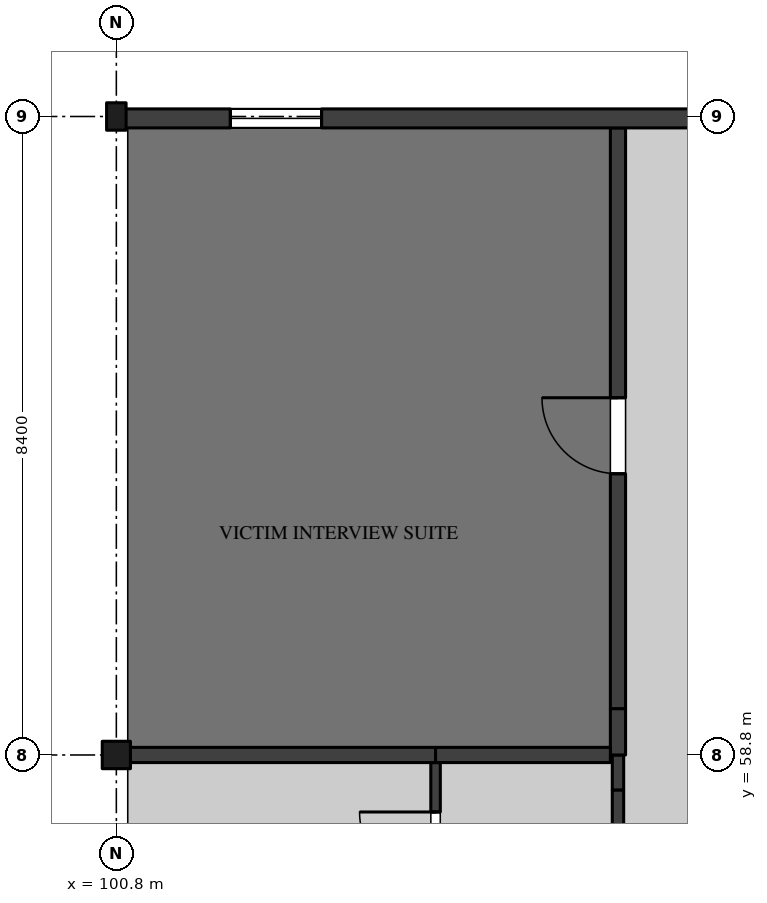
"""IFC4 building model, lengths in metres.
Left out: names, types, materials, properties, quantities, classifications, styles, units other than length and angle.
Written with IfcOpenShell. Run it as: python <this file> out.ifc"""

import sys

from ifc_helpers import new_model, si_unit, direction, frame, frame_2d, origin, origin_2d, place, context, subcontext, project, spatial, rectangle, i_section, extrude, element, fill, save


model = new_model("IFC4")
c1 = context("Model", 3, precision=1e-05, world=origin(), true_north=direction((0.0, 1.0)))
c2 = subcontext(c1, "Body", "Model", "MODEL_VIEW")
j1 = project(units=[si_unit("LENGTHUNIT", "METRE"), si_unit("PLANEANGLEUNIT", "RADIAN")], contexts=[c1])
p1 = place(None, origin())
s1 = spatial("IfcSite", under=j1, at=p1, CompositionType="ELEMENT")
p2 = place(p1, origin())
s2 = spatial("IfcBuilding", under=s1, at=p2, CompositionType="ELEMENT")
p3 = place(p2, frame((0.0, 0.0, 32.4)))
s3 = spatial("IfcBuildingStorey", under=s2, at=p3, CompositionType="ELEMENT", Elevation=32.4)
p4 = place(p3, frame((100.8, 58.8, 0.0), z_axis=(0.0, 0.0, 1.0), x_axis=(1.0, 0.0, 0.0)))
e1 = element("IfcColumn", 1, at=p4, inside=s3, PredefinedType="COLUMN", context=c2, shape_type="SweptSolid", body=[
    extrude(i_section(OverallWidth=0.371, OverallDepth=0.361, WebThickness=0.012, FlangeThickness=0.02, FilletRadius=0.015, at=origin_2d()), origin(), (0.0, 0.0, 1.0), 4.37),
])
p5 = place(p3, frame((100.8, 67.2, 0.0), z_axis=(0.0, 0.0, 1.0), x_axis=(1.0, 0.0, 0.0)))
e2 = element("IfcColumn", 2, at=p5, inside=s3, PredefinedType="COLUMN", context=c2, shape_type="SweptSolid", body=[
    extrude(i_section(OverallWidth=0.257, OverallDepth=0.361, WebThickness=0.011, FlangeThickness=0.02, FilletRadius=0.015, at=origin_2d()), origin(), (0.0, 0.0, 1.0), 4.37),
])
p6 = place(p3, frame((107.4, 50.86, 0.0), z_axis=(0.0, 0.0, 1.0), x_axis=(0.0, 1.0, 0.0)))
e3 = element("IfcWall", 3, at=p6, inside=s3, PredefinedType="PARTITIONING", context=c2, shape_type="SweptSolid", body=[
    extrude(rectangle(XDim=7.48, YDim=0.15, at=frame_2d((3.74, 0.0))), origin(), (0.0, 0.0, 1.0), 4.37),
])
p7 = place(p6, frame((2.09, 0.0, 0.0)))
e4 = element("IfcOpeningElement", 4, at=p7, cuts=e3, PredefinedType="OPENING", context=c2, shape_type="SweptSolid", body=[
    extrude(rectangle(XDim=0.9, YDim=2.1, at=frame_2d((0.45, 1.05))), frame((0.0, 0.085, 0.0), z_axis=(0.0, -1.0, 0.0), x_axis=(1.0, 0.0, 0.0)), (0.0, 0.0, 1.0), 0.17),
])
p8 = place(p3, frame((107.4, 58.34, 0.0), z_axis=(0.0, 0.0, 1.0), x_axis=(0.0, 1.0, 0.0)))
e5 = element("IfcWall", 5, at=p8, inside=s3, PredefinedType="PARTITIONING", context=c2, shape_type="SweptSolid", body=[
    extrude(rectangle(XDim=0.46, YDim=0.15, at=frame_2d((0.23, 0.0))), origin(), (0.0, 0.0, 1.0), 3.746),
])
p9 = place(p3, frame((107.4, 58.8, 0.0), z_axis=(0.0, 0.0, 1.0), x_axis=(0.0, 1.0, 0.0)))
e6 = element("IfcWall", 6, at=p9, inside=s3, PredefinedType="PARTITIONING", context=c2, shape_type="SweptSolid", body=[
    extrude(rectangle(XDim=0.61, YDim=0.2, at=frame_2d((0.305, 0.0))), origin(), (0.0, 0.0, 1.0), 3.746),
])
p10 = place(p3, frame((107.4, 59.41, 0.0), z_axis=(0.0, 0.0, 1.0), x_axis=(0.0, 1.0, 0.0)))
e7 = element("IfcWall", 7, at=p10, inside=s3, PredefinedType="PARTITIONING", context=c2, shape_type="SweptSolid", body=[
    extrude(rectangle(XDim=7.64, YDim=0.2, at=frame_2d((3.82, 0.0))), origin(), (0.0, 0.0, 1.0), 4.37),
])
p11 = place(p10, frame((3.09, 0.0, 0.0)))
e8 = element("IfcOpeningElement", 8, at=p11, cuts=e7, PredefinedType="OPENING", context=c2, shape_type="SweptSolid", body=[
    extrude(rectangle(XDim=1.0, YDim=2.1, at=frame_2d((0.5, 1.05))), frame((0.0, 0.11, 0.0), z_axis=(0.0, -1.0, 0.0), x_axis=(1.0, 0.0, 0.0)), (0.0, 0.0, 1.0), 0.22),
])
p12 = place(p3, frame((105.0, 56.4, 0.0), z_axis=(0.0, 0.0, 1.0), x_axis=(0.0, 1.0, 0.0)))
e9 = element("IfcWall", 9, at=p12, inside=s3, PredefinedType="PARTITIONING", context=c2, shape_type="SweptSolid", body=[
    extrude(rectangle(XDim=2.3, YDim=0.125, at=frame_2d((1.15, 0.0))), origin(), (0.0, 0.0, 1.0), 4.37),
])
p13 = place(p12, frame((0.65, 0.0, 0.0)))
e10 = element("IfcOpeningElement", 10, at=p13, cuts=e9, PredefinedType="OPENING", context=c2, shape_type="SweptSolid", body=[
    extrude(rectangle(XDim=1.0, YDim=2.1, at=frame_2d((0.5, 1.05))), frame((0.0, 0.073, 0.0), z_axis=(0.0, -1.0, 0.0), x_axis=(1.0, 0.0, 0.0)), (0.0, 0.0, 1.0), 0.145),
])
p14 = place(p3, frame((100.986, 58.8, 0.0), z_axis=(0.0, 0.0, 1.0), x_axis=(1.0, 0.0, 0.0)))
e11 = element("IfcWall", 11, at=p14, inside=s3, PredefinedType="PARTITIONING", context=c2, shape_type="SweptSolid", body=[
    extrude(rectangle(XDim=4.014, YDim=0.2, at=frame_2d((2.007, 0.0))), origin(), (0.0, 0.0, 1.0), 3.746),
])
p15 = place(p3, frame((105.0, 58.8, 0.0), z_axis=(0.0, 0.0, 1.0), x_axis=(1.0, 0.0, 0.0)))
e12 = element("IfcWall", 12, at=p15, inside=s3, PredefinedType="PARTITIONING", context=c2, shape_type="SweptSolid", body=[
    extrude(rectangle(XDim=2.3, YDim=0.2, at=frame_2d((1.15, 0.0))), origin(), (0.0, 0.0, 1.0), 3.746),
])
p16 = place(p3, frame((109.0, 67.175, 0.0), z_axis=(0.0, 0.0, 1.0), x_axis=(-1.0, 0.0, 0.0)))
e13 = element("IfcWall", 13, at=p16, inside=s3, PredefinedType="SOLIDWALL", context=c2, shape_type="SweptSolid", body=[
    extrude(rectangle(XDim=8.196, YDim=0.25, at=frame_2d((4.098, 0.0))), origin(), (0.0, 0.0, 1.0), 3.746),
])
p17 = place(p16, frame((5.5, 0.0, 2.1)))
e14 = element("IfcOpeningElement", 14, at=p17, cuts=e13, PredefinedType="OPENING", context=c2, shape_type="SweptSolid", body=[
    extrude(rectangle(XDim=1.2, YDim=0.45, at=frame_2d((0.6, 0.225))), frame((0.0, 0.135, 0.0), z_axis=(0.0, -1.0, 0.0), x_axis=(1.0, 0.0, 0.0)), (0.0, 0.0, 1.0), 0.27),
])
p18 = place(p13, origin())
e15 = element("IfcDoor", 15, at=p18, inside=s3, OperationType="SINGLE_SWING_LEFT", PredefinedType="DOOR", context=c2, shape_type="SweptSolid", body=[
    extrude(rectangle(XDim=1.0, YDim=2.1, at=frame_2d((0.5, 1.05))), frame((0.0, 0.02, 0.0), z_axis=(0.0, -1.0, 0.0), x_axis=(1.0, 0.0, 0.0)), (0.0, 0.0, 1.0), 0.04),
])
fill(e10, e15)
p19 = place(p11, origin())
e16 = element("IfcDoor", 16, at=p19, inside=s3, OperationType="SINGLE_SWING_LEFT", PredefinedType="DOOR", context=c2, shape_type="SweptSolid", body=[
    extrude(rectangle(XDim=1.0, YDim=2.1, at=frame_2d((0.5, 1.05))), frame((0.0, 0.045, 0.0), z_axis=(0.0, -1.0, 0.0), x_axis=(1.0, 0.0, 0.0)), (0.0, 0.0, 1.0), 0.09),
])
fill(e8, e16)
p20 = place(p17, origin())
e17 = element("IfcWindow", 17, at=p20, inside=s3, PartitioningType="SINGLE_PANEL", PredefinedType="WINDOW", context=c2, shape_type="SweptSolid", body=[
    extrude(rectangle(XDim=1.2, YDim=0.45, at=frame_2d((0.6, 0.225))), frame((0.0, 0.05, 0.0), z_axis=(0.0, -1.0, 0.0), x_axis=(1.0, 0.0, 0.0)), (0.0, 0.0, 1.0), 0.1),
])
fill(e14, e17)
save(model, sys.argv[1])
